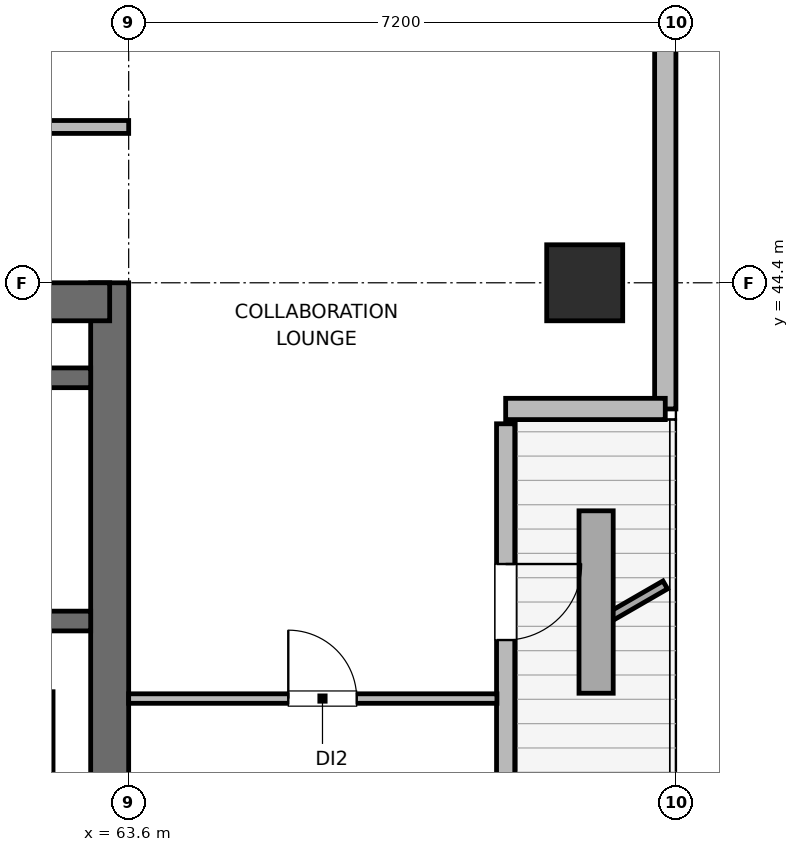
"""IFC4 building model, lengths in metres.
Left out: names, types, materials, properties, quantities, classifications, styles, units other than length and angle.
Written with IfcOpenShell. Run it as: python <this file> out.ifc"""

import sys

from ifc_helpers import new_model, si_unit, direction, frame, frame_2d, origin, origin_2d, place, context, subcontext, project, spatial, rectangle, extrude, element, fill, save


model = new_model("IFC4")
c1 = context("Model", 3, precision=1e-05, world=origin(), true_north=direction((0.0, 1.0)))
c2 = subcontext(c1, "Body", "Model", "MODEL_VIEW")
j1 = project(units=[si_unit("LENGTHUNIT", "METRE"), si_unit("PLANEANGLEUNIT", "RADIAN")], contexts=[c1])
p1 = place(None, origin())
s1 = spatial("IfcSite", under=j1, at=p1, CompositionType="ELEMENT")
p2 = place(p1, origin())
s2 = spatial("IfcBuilding", under=s1, at=p2, CompositionType="ELEMENT")
p3 = place(p2, frame((0.0, 0.0, 270.6)))
s3 = spatial("IfcBuildingStorey", under=s2, at=p3, CompositionType="ELEMENT", Elevation=270.6)
p4 = place(p3, frame((63.35, 27.6, 0.0), z_axis=(0.0, 0.0, 1.0), x_axis=(0.0, 1.0, 0.0)))
e1 = element("IfcWall", 1, at=p4, inside=s3, PredefinedType="SHEAR", context=c2, shape_type="SweptSolid", body=[
    extrude(rectangle(XDim=16.8, YDim=0.5, at=frame_2d((8.4, 0.0))), origin(), (0.0, 0.0, 1.0), 3.9),
])
p5 = place(p3, frame((53.85, 44.15, 0.0), z_axis=(0.0, 0.0, 1.0), x_axis=(1.0, 0.0, 0.0)))
e2 = element("IfcWall", 2, at=p5, inside=s3, PredefinedType="SHEAR", context=c2, shape_type="SweptSolid", body=[
    extrude(rectangle(XDim=9.5, YDim=0.5, at=frame_2d((4.75, 0.0))), origin(), (0.0, 0.0, 1.0), 3.9),
])
p6 = place(p3, frame((54.1, 39.95, 0.0), z_axis=(0.0, 0.0, 1.0), x_axis=(1.0, 0.0, 0.0)))
e3 = element("IfcWall", 3, at=p6, inside=s3, PredefinedType="SHEAR", context=c2, shape_type="SweptSolid", body=[
    extrude(rectangle(XDim=9.0, YDim=0.26, at=frame_2d((4.5, 0.0))), origin(), (0.0, 0.0, 1.0), 3.9),
])
p7 = place(p6, frame((1.1, 0.0, 0.0)))
e4 = element("IfcOpeningElement", 4, at=p7, cuts=e3, PredefinedType="OPENING", context=c2, shape_type="SweptSolid", body=[
    extrude(rectangle(XDim=1.0, YDim=2.04, at=frame_2d((0.5, 1.02))), frame((0.0, 0.14, 0.0), z_axis=(0.0, -1.0, 0.0), x_axis=(1.0, 0.0, 0.0)), (0.0, 0.0, 1.0), 0.28),
])
p8 = place(p3, frame((54.1, 43.15, 0.0), z_axis=(0.0, 0.0, 1.0), x_axis=(1.0, 0.0, 0.0)))
e5 = element("IfcWall", 5, at=p8, inside=s3, PredefinedType="SHEAR", context=c2, shape_type="SweptSolid", body=[
    extrude(rectangle(XDim=9.0, YDim=0.26, at=frame_2d((4.5, 0.0))), origin(), (0.0, 0.0, 1.0), 3.9),
])
p9 = place(p3, frame((69.6, 44.4, 0.0), z_axis=(0.0, 0.0, 1.0), x_axis=(1.0, 0.0, 0.0)))
e6 = element("IfcColumn", 6, at=p9, inside=s3, PredefinedType="COLUMN", context=c2, shape_type="SweptSolid", body=[
    extrude(rectangle(XDim=1.0, YDim=1.0, at=origin_2d()), origin(), (0.0, 0.0, 1.0), 3.9),
])
p10 = place(p3, frame((70.66, 48.582, 0.0), z_axis=(0.0, 0.0, 1.0), x_axis=(0.0, -1.0, 0.0)))
e7 = element("IfcWall", 7, at=p10, inside=s3, PredefinedType="SOLIDWALL", context=c2, shape_type="SweptSolid", body=[
    extrude(rectangle(XDim=5.842, YDim=0.28, at=frame_2d((2.921, 0.0))), origin(), (0.0, 0.0, 1.0), 3.68),
])
p11 = place(p3, frame((70.66, 42.74, 0.0), z_axis=(0.0, 0.0, 1.0), x_axis=(-1.0, 0.0, 0.0)))
e8 = element("IfcWall", 8, at=p11, inside=s3, PredefinedType="SOLIDWALL", context=c2, shape_type="SweptSolid", body=[
    extrude(rectangle(XDim=2.1, YDim=0.28, at=frame_2d((1.05, 0.0))), origin(), (0.0, 0.0, 1.0), 3.126),
])
p12 = place(p3, frame((68.56, 42.545, 0.0), z_axis=(0.0, 0.0, 1.0), x_axis=(0.0, -1.0, 0.0)))
e9 = element("IfcWall", 9, at=p12, inside=s3, PredefinedType="SOLIDWALL", context=c2, shape_type="SweptSolid", body=[
    extrude(rectangle(XDim=4.69, YDim=0.24, at=frame_2d((2.345, 0.0))), origin(), (0.0, 0.0, 1.0), 3.311),
])
p13 = place(p12, frame((1.845, 0.0, 0.0)))
e10 = element("IfcOpeningElement", 10, at=p13, cuts=e9, PredefinedType="OPENING", context=c2, shape_type="SweptSolid", body=[
    extrude(rectangle(XDim=1.0, YDim=2.02, at=frame_2d((0.5, 1.01))), frame((0.0, 0.13, 0.0), z_axis=(0.0, -1.0, 0.0), x_axis=(1.0, 0.0, 0.0)), (0.0, 0.0, 1.0), 0.26),
])
p14 = place(p3, frame((62.5, 36.98, 0.0), z_axis=(0.0, 0.0, 1.0), x_axis=(0.0, 1.0, 0.0)))
e11 = element("IfcWall", 11, at=p14, inside=s3, PredefinedType="PARTITIONING", context=c2, shape_type="SweptSolid", body=[
    extrude(rectangle(XDim=2.04, YDim=0.21, at=frame_2d((1.02, 0.0))), origin(), (0.0, 0.0, 1.0), 3.68),
])
p15 = place(p3, frame((30.35, 46.45, 0.0), z_axis=(0.0, 0.0, 1.0), x_axis=(1.0, 0.0, 0.0)))
e12 = element("IfcWall", 12, at=p15, inside=s3, PredefinedType="PARTITIONING", context=c2, shape_type="SweptSolid", body=[
    extrude(rectangle(XDim=33.25, YDim=0.17, at=frame_2d((16.625, 0.0))), origin(), (0.0, 0.0, 1.0), 3.68),
])
p16 = place(p15, frame((2.35, 0.0, 0.0)))
e13 = element("IfcOpeningElement", 13, at=p16, cuts=e12, PredefinedType="OPENING", context=c2, shape_type="SweptSolid", body=[
    extrude(rectangle(XDim=0.95, YDim=2.04, at=frame_2d((0.475, 1.02))), frame((0.0, 0.095, 0.0), z_axis=(0.0, -1.0, 0.0), x_axis=(1.0, 0.0, 0.0)), (0.0, 0.0, 1.0), 0.19),
])
p17 = place(p15, frame((7.275, 0.0, 0.0)))
e14 = element("IfcOpeningElement", 14, at=p17, cuts=e12, PredefinedType="OPENING", context=c2, shape_type="SweptSolid", body=[
    extrude(rectangle(XDim=0.95, YDim=2.04, at=frame_2d((0.475, 1.02))), frame((0.0, 0.095, 0.0), z_axis=(0.0, -1.0, 0.0), x_axis=(1.0, 0.0, 0.0)), (0.0, 0.0, 1.0), 0.19),
])
p18 = place(p15, frame((12.475, 0.0, 0.0)))
e15 = element("IfcOpeningElement", 15, at=p18, cuts=e12, PredefinedType="OPENING", context=c2, shape_type="SweptSolid", body=[
    extrude(rectangle(XDim=0.95, YDim=2.04, at=frame_2d((0.475, 1.02))), frame((0.0, 0.095, 0.0), z_axis=(0.0, -1.0, 0.0), x_axis=(1.0, 0.0, 0.0)), (0.0, 0.0, 1.0), 0.19),
])
p19 = place(p15, frame((18.175, 0.0, 0.0)))
e16 = element("IfcOpeningElement", 16, at=p19, cuts=e12, PredefinedType="OPENING", context=c2, shape_type="SweptSolid", body=[
    extrude(rectangle(XDim=0.95, YDim=2.04, at=frame_2d((0.475, 1.02))), frame((0.0, 0.095, 0.0), z_axis=(0.0, -1.0, 0.0), x_axis=(1.0, 0.0, 0.0)), (0.0, 0.0, 1.0), 0.19),
])
p20 = place(p15, frame((23.175, 0.0, 0.0)))
e17 = element("IfcOpeningElement", 17, at=p20, cuts=e12, PredefinedType="OPENING", context=c2, shape_type="SweptSolid", body=[
    extrude(rectangle(XDim=0.95, YDim=2.04, at=frame_2d((0.475, 1.02))), frame((0.0, 0.095, 0.0), z_axis=(0.0, -1.0, 0.0), x_axis=(1.0, 0.0, 0.0)), (0.0, 0.0, 1.0), 0.19),
])
p21 = place(p15, frame((27.675, 0.0, 0.0)))
e18 = element("IfcOpeningElement", 18, at=p21, cuts=e12, PredefinedType="OPENING", context=c2, shape_type="SweptSolid", body=[
    extrude(rectangle(XDim=0.95, YDim=2.04, at=frame_2d((0.475, 1.02))), frame((0.0, 0.095, 0.0), z_axis=(0.0, -1.0, 0.0), x_axis=(1.0, 0.0, 0.0)), (0.0, 0.0, 1.0), 0.19),
])
p22 = place(p15, frame((31.275, 0.0, 0.0)))
e19 = element("IfcOpeningElement", 19, at=p22, cuts=e12, PredefinedType="OPENING", context=c2, shape_type="SweptSolid", body=[
    extrude(rectangle(XDim=0.95, YDim=2.04, at=frame_2d((0.475, 1.02))), frame((0.0, 0.095, 0.0), z_axis=(0.0, -1.0, 0.0), x_axis=(1.0, 0.0, 0.0)), (0.0, 0.0, 1.0), 0.19),
])
p23 = place(p3, frame((63.6, 38.93, 0.0), z_axis=(0.0, 0.0, 1.0), x_axis=(1.0, 0.0, 0.0)))
e20 = element("IfcWall", 20, at=p23, inside=s3, PredefinedType="PARTITIONING", context=c2, shape_type="SweptSolid", body=[
    extrude(rectangle(XDim=4.845, YDim=0.125, at=frame_2d((2.422, 0.0))), origin(), (0.0, 0.0, 1.0), 3.68),
])
p24 = place(p23, frame((2.1, 0.0, 0.0)))
e21 = element("IfcOpeningElement", 21, at=p24, cuts=e20, PredefinedType="OPENING", context=c2, shape_type="SweptSolid", body=[
    extrude(rectangle(XDim=0.9, YDim=2.02, at=frame_2d((0.45, 1.01))), frame((0.0, 0.073, 0.0), z_axis=(0.0, -1.0, 0.0), x_axis=(1.0, 0.0, 0.0)), (0.0, 0.0, 1.0), 0.145),
])
p25 = place(p13, origin())
e22 = element("IfcDoor", 22, at=p25, inside=s3, OperationType="SINGLE_SWING_LEFT", PredefinedType="DOOR", context=c2, shape_type="SweptSolid", body=[
    extrude(rectangle(XDim=1.0, YDim=2.02, at=frame_2d((0.5, 1.01))), frame((0.0, 0.025, 0.0), z_axis=(0.0, -1.0, 0.0), x_axis=(1.0, 0.0, 0.0)), (0.0, 0.0, 1.0), 0.05),
])
fill(e10, e22)
p26 = place(p24, origin())
e23 = element("IfcDoor", 23, at=p26, inside=s3, OperationType="SINGLE_SWING_LEFT", PredefinedType="DOOR", context=c2, shape_type="SweptSolid", body=[
    extrude(rectangle(XDim=0.9, YDim=2.02, at=frame_2d((0.45, 1.01))), frame((0.0, 0.025, 0.0), z_axis=(0.0, -1.0, 0.0), x_axis=(1.0, 0.0, 0.0)), (0.0, 0.0, 1.0), 0.05),
])
fill(e21, e23)
save(model, sys.argv[1])
